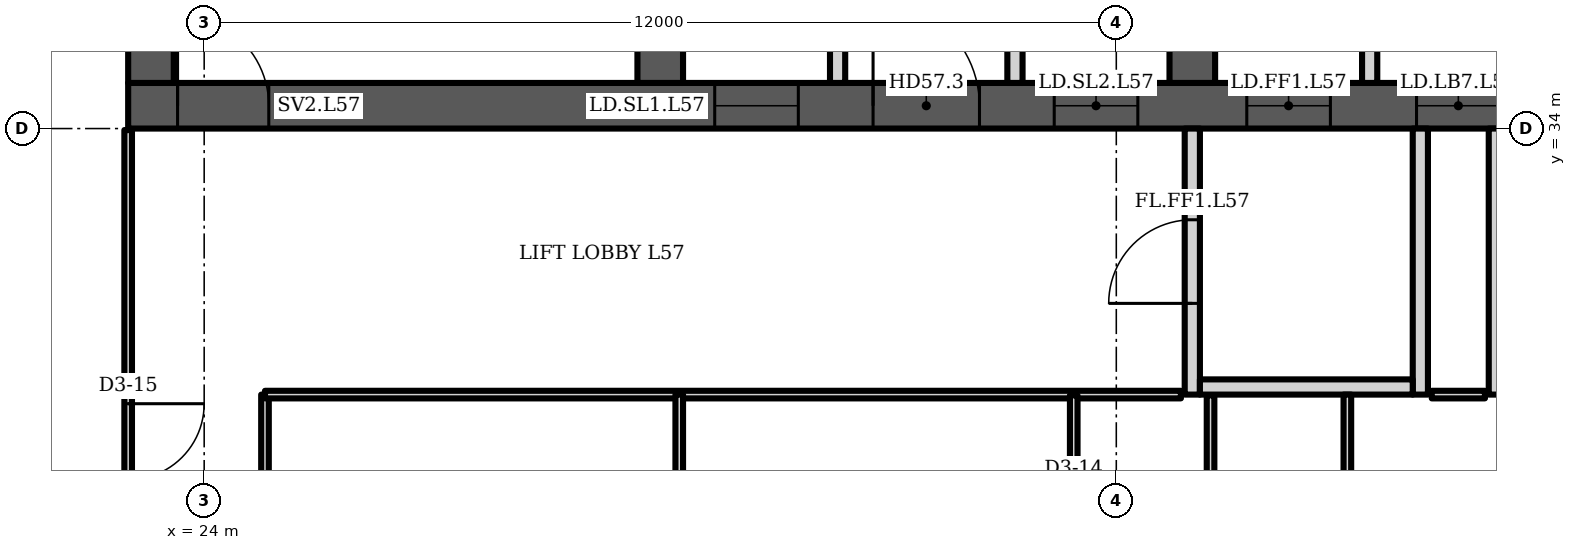
"""IFC4 building model, lengths in metres.
Left out: names, types, materials, properties, quantities, classifications, styles, units other than length and angle.
Written with IfcOpenShell. Run it as: python <this file> out.ifc"""

import sys

from ifc_helpers import new_model, si_unit, direction, frame, frame_2d, origin, place, context, subcontext, project, spatial, polyline, rectangle, outline, extrude, element, fill, save


model = new_model("IFC4")
c1 = context("Model", 3, precision=1e-05, world=origin(), true_north=direction((0.0, 1.0)))
c2 = subcontext(c1, "Body", "Model", "MODEL_VIEW")
j1 = project(units=[si_unit("LENGTHUNIT", "METRE"), si_unit("PLANEANGLEUNIT", "RADIAN")], contexts=[c1])
p1 = place(None, origin())
s1 = spatial("IfcSite", under=j1, at=p1, CompositionType="ELEMENT")
p2 = place(p1, origin())
s2 = spatial("IfcBuilding", under=s1, at=p2, CompositionType="ELEMENT")
p3 = place(p2, frame((0.0, 0.0, 228.7)))
s3 = spatial("IfcBuildingStorey", under=s2, at=p3, CompositionType="ELEMENT", Elevation=228.7)
p4 = place(p3, frame((23.0, 34.3, 0.0), z_axis=(0.0, 0.0, 1.0), x_axis=(1.0, 0.0, 0.0)))
e1 = element("IfcWall", 1, at=p4, inside=s3, PredefinedType="SHEAR", context=c2, shape_type="SweptSolid", body=[
    extrude(rectangle(XDim=35.0, YDim=0.6, at=frame_2d((17.5, 0.0))), origin(), (0.0, 0.0, 1.0), 3.6),
])
p5 = place(p4, frame((0.65, 0.0, 0.0)))
e2 = element("IfcOpeningElement", 2, at=p5, cuts=e1, PredefinedType="OPENING", context=c2, shape_type="SweptSolid", body=[
    extrude(rectangle(XDim=1.2, YDim=2.1, at=frame_2d((0.6, 1.05))), frame((0.0, 0.31, 0.0), z_axis=(0.0, -1.0, 0.0), x_axis=(1.0, 0.0, 0.0)), (0.0, 0.0, 1.0), 0.62),
])
p6 = place(p4, frame((7.717, 0.0, 0.0)))
e3 = element("IfcOpeningElement", 3, at=p6, cuts=e1, PredefinedType="OPENING", context=c2, shape_type="SweptSolid", body=[
    extrude(rectangle(XDim=1.1, YDim=2.1, at=frame_2d((0.55, 1.05))), frame((0.0, 0.31, 0.0), z_axis=(0.0, -1.0, 0.0), x_axis=(1.0, 0.0, 0.0)), (0.0, 0.0, 1.0), 0.62),
])
p7 = place(p4, frame((12.183, 0.0, 0.0)))
e4 = element("IfcOpeningElement", 4, at=p7, cuts=e1, PredefinedType="OPENING", context=c2, shape_type="SweptSolid", body=[
    extrude(rectangle(XDim=1.1, YDim=2.1, at=frame_2d((0.55, 1.05))), frame((0.0, 0.31, 0.0), z_axis=(0.0, -1.0, 0.0), x_axis=(1.0, 0.0, 0.0)), (0.0, 0.0, 1.0), 0.62),
])
p8 = place(p4, frame((9.8, 0.0, 0.0)))
e5 = element("IfcOpeningElement", 5, at=p8, cuts=e1, PredefinedType="OPENING", context=c2, shape_type="SweptSolid", body=[
    extrude(rectangle(XDim=1.4, YDim=2.1, at=frame_2d((0.7, 1.05))), frame((0.0, 0.31, 0.0), z_axis=(0.0, -1.0, 0.0), x_axis=(1.0, 0.0, 0.0)), (0.0, 0.0, 1.0), 0.62),
])
p9 = place(p4, frame((14.717, 0.0, 0.0)))
e6 = element("IfcOpeningElement", 6, at=p9, cuts=e1, PredefinedType="OPENING", context=c2, shape_type="SweptSolid", body=[
    extrude(rectangle(XDim=1.1, YDim=2.1, at=frame_2d((0.55, 1.05))), frame((0.0, 0.31, 0.0), z_axis=(0.0, -1.0, 0.0), x_axis=(1.0, 0.0, 0.0)), (0.0, 0.0, 1.0), 0.62),
])
p10 = place(p4, frame((16.95, 0.0, 0.0)))
e7 = element("IfcOpeningElement", 7, at=p10, cuts=e1, PredefinedType="OPENING", context=c2, shape_type="SweptSolid", body=[
    extrude(rectangle(XDim=1.1, YDim=2.1, at=frame_2d((0.55, 1.05))), frame((0.0, 0.31, 0.0), z_axis=(0.0, -1.0, 0.0), x_axis=(1.0, 0.0, 0.0)), (0.0, 0.0, 1.0), 0.62),
])
p11 = place(p4, frame((19.183, 0.0, 0.0)))
e8 = element("IfcOpeningElement", 8, at=p11, cuts=e1, PredefinedType="OPENING", context=c2, shape_type="SweptSolid", body=[
    extrude(rectangle(XDim=1.1, YDim=2.1, at=frame_2d((0.55, 1.05))), frame((0.0, 0.31, 0.0), z_axis=(0.0, -1.0, 0.0), x_axis=(1.0, 0.0, 0.0)), (0.0, 0.0, 1.0), 0.62),
])
p12 = place(p4, frame((26.15, 0.0, 0.0)))
e9 = element("IfcOpeningElement", 9, at=p12, cuts=e1, PredefinedType="OPENING", context=c2, shape_type="SweptSolid", body=[
    extrude(rectangle(XDim=1.2, YDim=2.1, at=frame_2d((0.6, 1.05))), frame((0.0, 0.31, 0.0), z_axis=(0.0, -1.0, 0.0), x_axis=(1.0, 0.0, 0.0)), (0.0, 0.0, 1.0), 0.62),
])
p13 = place(p4, frame((28.767, 0.0, 0.0)))
e10 = element("IfcOpeningElement", 10, at=p13, cuts=e1, PredefinedType="OPENING", context=c2, shape_type="SweptSolid", body=[
    extrude(rectangle(XDim=1.0, YDim=2.1, at=frame_2d((0.5, 1.05))), frame((0.0, 0.31, 0.0), z_axis=(0.0, -1.0, 0.0), x_axis=(1.0, 0.0, 0.0)), (0.0, 0.0, 1.0), 0.62),
])
p14 = place(p4, frame((33.083, 0.0, 0.0)))
e11 = element("IfcOpeningElement", 11, at=p14, cuts=e1, PredefinedType="OPENING", context=c2, shape_type="SweptSolid", body=[
    extrude(rectangle(XDim=1.0, YDim=2.1, at=frame_2d((0.5, 1.05))), frame((0.0, 0.31, 0.0), z_axis=(0.0, -1.0, 0.0), x_axis=(1.0, 0.0, 0.0)), (0.0, 0.0, 1.0), 0.62),
])
p15 = place(p4, frame((30.8, 0.0, 0.0)))
e12 = element("IfcOpeningElement", 12, at=p15, cuts=e1, PredefinedType="OPENING", context=c2, shape_type="SweptSolid", body=[
    extrude(rectangle(XDim=1.4, YDim=2.1, at=frame_2d((0.7, 1.05))), frame((0.0, 0.31, 0.0), z_axis=(0.0, -1.0, 0.0), x_axis=(1.0, 0.0, 0.0)), (0.0, 0.0, 1.0), 0.62),
])
p16 = place(p3, frame((23.3, 34.6, 0.0), z_axis=(0.0, 0.0, 1.0), x_axis=(0.0, 1.0, 0.0)))
e13 = element("IfcWall", 13, at=p16, inside=s3, PredefinedType="SHEAR", context=c2, shape_type="SweptSolid", body=[
    extrude(rectangle(XDim=13.585, YDim=0.6, at=frame_2d((6.792, 0.0))), origin(), (0.0, 0.0, 1.0), 3.6),
])
p17 = place(p3, frame((30.0, 34.6, 0.0), z_axis=(0.0, 0.0, 1.0), x_axis=(0.0, 1.0, 0.0)))
e14 = element("IfcWall", 14, at=p17, inside=s3, PredefinedType="SHEAR", context=c2, shape_type="SweptSolid", body=[
    extrude(rectangle(XDim=14.171, YDim=0.6, at=frame_2d((7.085, 0.0))), origin(), (0.0, 0.0, 1.0), 3.6),
])
p18 = place(p17, frame((3.8, 0.0, 0.0)))
e15 = element("IfcOpeningElement", 15, at=p18, cuts=e14, PredefinedType="OPENING", context=c2, shape_type="SweptSolid", body=[
    extrude(rectangle(XDim=1.1, YDim=2.1, at=frame_2d((0.55, 1.05))), frame((0.0, 0.31, 0.0), z_axis=(0.0, -1.0, 0.0), x_axis=(1.0, 0.0, 0.0)), (0.0, 0.0, 1.0), 0.62),
])
p19 = place(p3, frame((37.0, 34.6, 0.0), z_axis=(0.0, 0.0, 1.0), x_axis=(0.0, 1.0, 0.0)))
e16 = element("IfcWall", 16, at=p19, inside=s3, PredefinedType="SHEAR", context=c2, shape_type="SweptSolid", body=[
    extrude(rectangle(XDim=14.784, YDim=0.6, at=frame_2d((7.392, 0.0))), origin(), (0.0, 0.0, 1.0), 3.6),
])
p20 = place(p19, frame((11.302, 0.0, 0.0)))
e17 = element("IfcOpeningElement", 17, at=p20, cuts=e16, PredefinedType="OPENING", context=c2, shape_type="SweptSolid", body=[
    extrude(rectangle(XDim=1.0, YDim=2.1, at=frame_2d((0.5, 1.05))), frame((0.0, 0.31, 0.0), z_axis=(0.0, -1.0, 0.0), x_axis=(1.0, 0.0, 0.0)), (0.0, 0.0, 1.0), 0.62),
])
p21 = place(p19, frame((3.8, 0.0, 0.0)))
e18 = element("IfcOpeningElement", 18, at=p21, cuts=e16, PredefinedType="OPENING", context=c2, shape_type="SweptSolid", body=[
    extrude(rectangle(XDim=1.1, YDim=2.1, at=frame_2d((0.55, 1.05))), frame((0.0, 0.31, 0.0), z_axis=(0.0, -1.0, 0.0), x_axis=(1.0, 0.0, 0.0)), (0.0, 0.0, 1.0), 0.62),
])
p22 = place(p3, frame((0.0, 0.0, -0.0)))
e19 = element("IfcWall", 19, at=p22, inside=s3, PredefinedType="PARTITIONING", context=c2, shape_type="SweptSolid", body=[
    extrude(outline(polyline([(32.233, 37.45), (30.3, 37.45), (30.3, 37.65), (32.233, 37.65), (32.433, 37.65), (32.433, 34.6), (32.233, 34.6), (32.233, 37.45)])), origin(), (0.0, 0.0, 1.0), 3.2),
])
p23 = place(p3, frame((0.0, 0.0, -0.0)))
e20 = element("IfcWall", 20, at=p23, inside=s3, PredefinedType="PARTITIONING", context=c2, shape_type="SweptSolid", body=[
    extrude(outline(polyline([(34.567, 37.65), (34.767, 37.65), (36.7, 37.65), (36.7, 37.45), (34.767, 37.45), (34.767, 34.6), (34.567, 34.6), (34.567, 37.65)])), origin(), (0.0, 0.0, 1.0), 3.2),
])
p24 = place(p3, frame((0.0, 0.0, -0.0)))
e21 = element("IfcWall", 21, at=p24, inside=s3, PredefinedType="PARTITIONING", context=c2, shape_type="SweptSolid", body=[
    extrude(outline(polyline([(41.567, 37.1), (39.433, 37.1), (39.433, 34.6), (39.233, 34.6), (39.233, 37.45), (37.3, 37.45), (37.3, 37.65), (39.233, 37.65), (39.433, 37.65), (39.433, 37.3), (41.567, 37.3), (41.567, 37.35), (41.767, 37.35), (43.7, 37.35), (43.7, 37.15), (41.767, 37.15), (41.767, 34.6), (41.567, 34.6), (41.567, 37.1)])), origin(), (0.0, 0.0, 1.0), 3.2),
])
p25 = place(p3, frame((37.0, 30.5, 0.0), z_axis=(0.0, 0.0, 1.0), x_axis=(0.0, 1.0, 0.0)))
e22 = element("IfcWall", 22, at=p25, inside=s3, PredefinedType="PARTITIONING", context=c2, shape_type="SweptSolid", body=[
    extrude(rectangle(XDim=3.5, YDim=0.2, at=frame_2d((1.75, 0.0))), origin(), (0.0, 0.0, 1.0), 3.2),
])
p26 = place(p25, frame((1.2, 0.0, 0.0)))
e23 = element("IfcOpeningElement", 23, at=p26, cuts=e22, PredefinedType="OPENING", context=c2, shape_type="SweptSolid", body=[
    extrude(rectangle(XDim=1.1, YDim=2.1, at=frame_2d((0.55, 1.05))), frame((0.0, 0.11, 0.0), z_axis=(0.0, -1.0, 0.0), x_axis=(1.0, 0.0, 0.0)), (0.0, 0.0, 1.0), 0.22),
])
p27 = place(p3, frame((40.0, 30.5, 0.0), z_axis=(0.0, 0.0, 1.0), x_axis=(0.0, 1.0, 0.0)))
e24 = element("IfcWall", 24, at=p27, inside=s3, PredefinedType="PARTITIONING", context=c2, shape_type="SweptSolid", body=[
    extrude(rectangle(XDim=3.5, YDim=0.2, at=frame_2d((1.75, 0.0))), origin(), (0.0, 0.0, 1.0), 3.2),
])
p28 = place(p3, frame((37.1, 30.6, 0.0), z_axis=(0.0, 0.0, 1.0), x_axis=(1.0, 0.0, 0.0)))
e25 = element("IfcWall", 25, at=p28, inside=s3, PredefinedType="PARTITIONING", context=c2, shape_type="SweptSolid", body=[
    extrude(rectangle(XDim=2.8, YDim=0.2, at=frame_2d((1.4, 0.0))), origin(), (0.0, 0.0, 1.0), 3.2),
])
p29 = place(p3, frame((41.0, 30.5, 0.0), z_axis=(0.0, 0.0, 1.0), x_axis=(0.0, 1.0, 0.0)))
e26 = element("IfcWall", 26, at=p29, inside=s3, PredefinedType="PARTITIONING", context=c2, shape_type="SweptSolid", body=[
    extrude(rectangle(XDim=3.5, YDim=0.2, at=frame_2d((1.75, 0.0))), origin(), (0.0, 0.0, 1.0), 3.2),
])
p30 = place(p3, frame((23.0, 24.275, 0.0), z_axis=(0.0, 0.0, 1.0), x_axis=(0.0, 1.0, 0.0)))
e27 = element("IfcWall", 27, at=p30, inside=s3, PredefinedType="PARTITIONING", context=c2, shape_type="SweptSolid", body=[
    extrude(rectangle(XDim=9.705, YDim=0.1, at=frame_2d((4.853, 0.0))), origin(), (0.0, 0.0, 1.0), 3.2),
])
p31 = place(p30, frame((5.105, 0.0, 0.0)))
e28 = element("IfcOpeningElement", 28, at=p31, cuts=e27, PredefinedType="OPENING", context=c2, shape_type="SweptSolid", body=[
    extrude(rectangle(XDim=1.0, YDim=2.1, at=frame_2d((0.5, 1.05))), frame((0.0, 0.06, 0.0), z_axis=(0.0, -1.0, 0.0), x_axis=(1.0, 0.0, 0.0)), (0.0, 0.0, 1.0), 0.12),
])
p32 = place(p3, frame((24.8, 25.05, 0.0), z_axis=(0.0, 0.0, 1.0), x_axis=(0.0, 1.0, 0.0)))
e29 = element("IfcWall", 29, at=p32, inside=s3, PredefinedType="PARTITIONING", context=c2, shape_type="SweptSolid", body=[
    extrude(rectangle(XDim=5.45, YDim=0.1, at=frame_2d((2.725, 0.0))), origin(), (0.0, 0.0, 1.0), 3.2),
])
p33 = place(p32, frame((1.455, 0.0, 0.0)))
e30 = element("IfcOpeningElement", 30, at=p33, cuts=e29, PredefinedType="OPENING", context=c2, shape_type="SweptSolid", body=[
    extrude(rectangle(XDim=1.0, YDim=2.1, at=frame_2d((0.5, 1.05))), frame((0.0, 0.06, 0.0), z_axis=(0.0, -1.0, 0.0), x_axis=(1.0, 0.0, 0.0)), (0.0, 0.0, 1.0), 0.12),
])
p34 = place(p3, frame((24.8, 30.5, 0.0), z_axis=(0.0, 0.0, 1.0), x_axis=(1.0, 0.0, 0.0)))
e31 = element("IfcWall", 31, at=p34, inside=s3, PredefinedType="PARTITIONING", context=c2, shape_type="SweptSolid", body=[
    extrude(rectangle(XDim=12.05, YDim=0.1, at=frame_2d((6.025, 0.0))), origin(), (0.0, 0.0, 1.0), 3.2),
])
p35 = place(p3, frame((30.25, 17.0, 0.0), z_axis=(0.0, 0.0, 1.0), x_axis=(0.0, 1.0, 0.0)))
e32 = element("IfcWall", 32, at=p35, inside=s3, PredefinedType="PARTITIONING", context=c2, shape_type="SweptSolid", body=[
    extrude(rectangle(XDim=13.5, YDim=0.1, at=frame_2d((6.75, 0.0))), origin(), (0.0, 0.0, 1.0), 3.2),
])
p36 = place(p3, frame((35.44, 16.995, 0.0), z_axis=(0.0, 0.0, 1.0), x_axis=(0.0, 1.0, 0.0)))
e33 = element("IfcWall", 33, at=p36, inside=s3, PredefinedType="PARTITIONING", context=c2, shape_type="SweptSolid", body=[
    extrude(rectangle(XDim=13.495, YDim=0.1, at=frame_2d((6.748, 0.0))), origin(), (0.0, 0.0, 1.0), 3.2),
])
p37 = place(p36, frame((2.166, 0.0, 0.0)))
e34 = element("IfcOpeningElement", 34, at=p37, cuts=e33, PredefinedType="OPENING", context=c2, shape_type="SweptSolid", body=[
    extrude(rectangle(XDim=0.9, YDim=2.1, at=frame_2d((0.45, 1.05))), frame((0.0, 0.06, 0.0), z_axis=(0.0, -1.0, 0.0), x_axis=(1.0, 0.0, 0.0)), (0.0, 0.0, 1.0), 0.12),
])
p38 = place(p36, frame((7.215, 0.0, 0.0)))
e35 = element("IfcOpeningElement", 35, at=p38, cuts=e33, PredefinedType="OPENING", context=c2, shape_type="SweptSolid", body=[
    extrude(rectangle(XDim=0.9, YDim=2.1, at=frame_2d((0.45, 1.05))), frame((0.0, 0.06, 0.0), z_axis=(0.0, -1.0, 0.0), x_axis=(1.0, 0.0, 0.0)), (0.0, 0.0, 1.0), 0.12),
])
p39 = place(p36, frame((11.285, 0.0, 0.0)))
e36 = element("IfcOpeningElement", 36, at=p39, cuts=e33, PredefinedType="OPENING", context=c2, shape_type="SweptSolid", body=[
    extrude(rectangle(XDim=1.0, YDim=2.1, at=frame_2d((0.5, 1.05))), frame((0.0, 0.06, 0.0), z_axis=(0.0, -1.0, 0.0), x_axis=(1.0, 0.0, 0.0)), (0.0, 0.0, 1.0), 0.12),
])
p40 = place(p3, frame((37.24, 4.587, 0.0), z_axis=(0.0, 0.0, 1.0), x_axis=(0.0, 1.0, 0.0)))
e37 = element("IfcWall", 37, at=p40, inside=s3, PredefinedType="PARTITIONING", context=c2, shape_type="SweptSolid", body=[
    extrude(rectangle(XDim=25.903, YDim=0.1, at=frame_2d((12.952, 0.0))), origin(), (0.0, 0.0, 1.0), 2.58),
])
p41 = place(p40, frame((11.802, 0.0, 0.0)))
e38 = element("IfcOpeningElement", 38, at=p41, cuts=e37, PredefinedType="OPENING", context=c2, shape_type="SweptSolid", body=[
    extrude(rectangle(XDim=1.0, YDim=2.1, at=frame_2d((0.5, 1.05))), frame((0.0, 0.06, 0.0), z_axis=(0.0, -1.0, 0.0), x_axis=(1.0, 0.0, 0.0)), (0.0, 0.0, 1.0), 0.12),
])
p42 = place(p3, frame((39.04, 15.245, 0.0), z_axis=(0.0, 0.0, 1.0), x_axis=(0.0, 1.0, 0.0)))
e39 = element("IfcWall", 39, at=p42, inside=s3, PredefinedType="PARTITIONING", context=c2, shape_type="SweptSolid", body=[
    extrude(rectangle(XDim=15.255, YDim=0.1, at=frame_2d((7.627, 0.0))), origin(), (0.0, 0.0, 1.0), 3.2),
])
p43 = place(p42, frame((3.575, 0.0, 0.0)))
e40 = element("IfcOpeningElement", 40, at=p43, cuts=e39, PredefinedType="OPENING", context=c2, shape_type="SweptSolid", body=[
    extrude(rectangle(XDim=1.0, YDim=2.1, at=frame_2d((0.5, 1.05))), frame((0.0, 0.06, 0.0), z_axis=(0.0, -1.0, 0.0), x_axis=(1.0, 0.0, 0.0)), (0.0, 0.0, 1.0), 0.12),
])
p44 = place(p42, frame((8.075, 0.0, 0.0)))
e41 = element("IfcOpeningElement", 41, at=p44, cuts=e39, PredefinedType="OPENING", context=c2, shape_type="SweptSolid", body=[
    extrude(rectangle(XDim=1.0, YDim=2.1, at=frame_2d((0.5, 1.05))), frame((0.0, 0.06, 0.0), z_axis=(0.0, -1.0, 0.0), x_axis=(1.0, 0.0, 0.0)), (0.0, 0.0, 1.0), 0.12),
])
p45 = place(p3, frame((40.15, 30.5, 0.0), z_axis=(0.0, 0.0, 1.0), x_axis=(1.0, 0.0, 0.0)))
e42 = element("IfcWall", 42, at=p45, inside=s3, PredefinedType="PARTITIONING", context=c2, shape_type="SweptSolid", body=[
    extrude(rectangle(XDim=0.7, YDim=0.1, at=frame_2d((0.35, 0.0))), origin(), (0.0, 0.0, 1.0), 3.2),
])
p46 = place(p5, origin())
e43 = element("IfcDoor", 43, at=p46, inside=s3, OperationType="SINGLE_SWING_LEFT", PredefinedType="DOOR", context=c2, shape_type="SweptSolid", body=[
    extrude(rectangle(XDim=1.2, YDim=2.1, at=frame_2d((0.6, 1.05))), frame((0.0, 0.025, 0.0), z_axis=(0.0, -1.0, 0.0), x_axis=(1.0, 0.0, 0.0)), (0.0, 0.0, 1.0), 0.05),
])
fill(e2, e43)
p47 = place(p6, origin())
e44 = element("IfcDoor", 44, at=p47, inside=s3, OperationType="DOUBLE_DOOR_SLIDING", PredefinedType="DOOR", context=c2, shape_type="SweptSolid", body=[
    extrude(rectangle(XDim=1.1, YDim=2.1, at=frame_2d((0.55, 1.05))), frame((0.0, 0.025, 0.0), z_axis=(0.0, -1.0, 0.0), x_axis=(1.0, 0.0, 0.0)), (0.0, 0.0, 1.0), 0.05),
])
fill(e3, e44)
p48 = place(p7, origin())
e45 = element("IfcDoor", 45, at=p48, inside=s3, OperationType="DOUBLE_DOOR_SLIDING", PredefinedType="DOOR", context=c2, shape_type="SweptSolid", body=[
    extrude(rectangle(XDim=1.1, YDim=2.1, at=frame_2d((0.55, 1.05))), frame((0.0, 0.025, 0.0), z_axis=(0.0, -1.0, 0.0), x_axis=(1.0, 0.0, 0.0)), (0.0, 0.0, 1.0), 0.05),
])
fill(e4, e45)
p49 = place(p8, origin())
e46 = element("IfcDoor", 46, at=p49, inside=s3, OperationType="DOUBLE_DOOR_SINGLE_SWING", PredefinedType="DOOR", context=c2, shape_type="SweptSolid", body=[
    extrude(rectangle(XDim=1.4, YDim=2.1, at=frame_2d((0.7, 1.05))), frame((0.0, 0.025, 0.0), z_axis=(0.0, -1.0, 0.0), x_axis=(1.0, 0.0, 0.0)), (0.0, 0.0, 1.0), 0.05),
])
fill(e5, e46)
p50 = place(p9, origin())
e47 = element("IfcDoor", 47, at=p50, inside=s3, OperationType="DOUBLE_DOOR_SLIDING", PredefinedType="DOOR", context=c2, shape_type="SweptSolid", body=[
    extrude(rectangle(XDim=1.1, YDim=2.1, at=frame_2d((0.55, 1.05))), frame((0.0, 0.025, 0.0), z_axis=(0.0, -1.0, 0.0), x_axis=(1.0, 0.0, 0.0)), (0.0, 0.0, 1.0), 0.05),
])
fill(e6, e47)
p51 = place(p10, origin())
e48 = element("IfcDoor", 48, at=p51, inside=s3, OperationType="DOUBLE_DOOR_SLIDING", PredefinedType="DOOR", context=c2, shape_type="SweptSolid", body=[
    extrude(rectangle(XDim=1.1, YDim=2.1, at=frame_2d((0.55, 1.05))), frame((0.0, 0.025, 0.0), z_axis=(0.0, -1.0, 0.0), x_axis=(1.0, 0.0, 0.0)), (0.0, 0.0, 1.0), 0.05),
])
fill(e7, e48)
p52 = place(p26, origin())
e49 = element("IfcDoor", 49, at=p52, inside=s3, OperationType="SINGLE_SWING_LEFT", PredefinedType="DOOR", context=c2, shape_type="SweptSolid", body=[
    extrude(rectangle(XDim=1.1, YDim=2.1, at=frame_2d((0.55, 1.05))), frame((0.0, 0.025, 0.0), z_axis=(0.0, -1.0, 0.0), x_axis=(1.0, 0.0, 0.0)), (0.0, 0.0, 1.0), 0.05),
])
fill(e23, e49)
p53 = place(p31, origin())
e50 = element("IfcDoor", 50, at=p53, inside=s3, OperationType="SINGLE_SWING_RIGHT", PredefinedType="DOOR", context=c2, shape_type="SweptSolid", body=[
    extrude(rectangle(XDim=1.0, YDim=2.1, at=frame_2d((0.5, 1.05))), frame((0.0, 0.025, 0.0), z_axis=(0.0, -1.0, 0.0), x_axis=(1.0, 0.0, 0.0)), (0.0, 0.0, 1.0), 0.05),
])
fill(e28, e50)
save(model, sys.argv[1])
